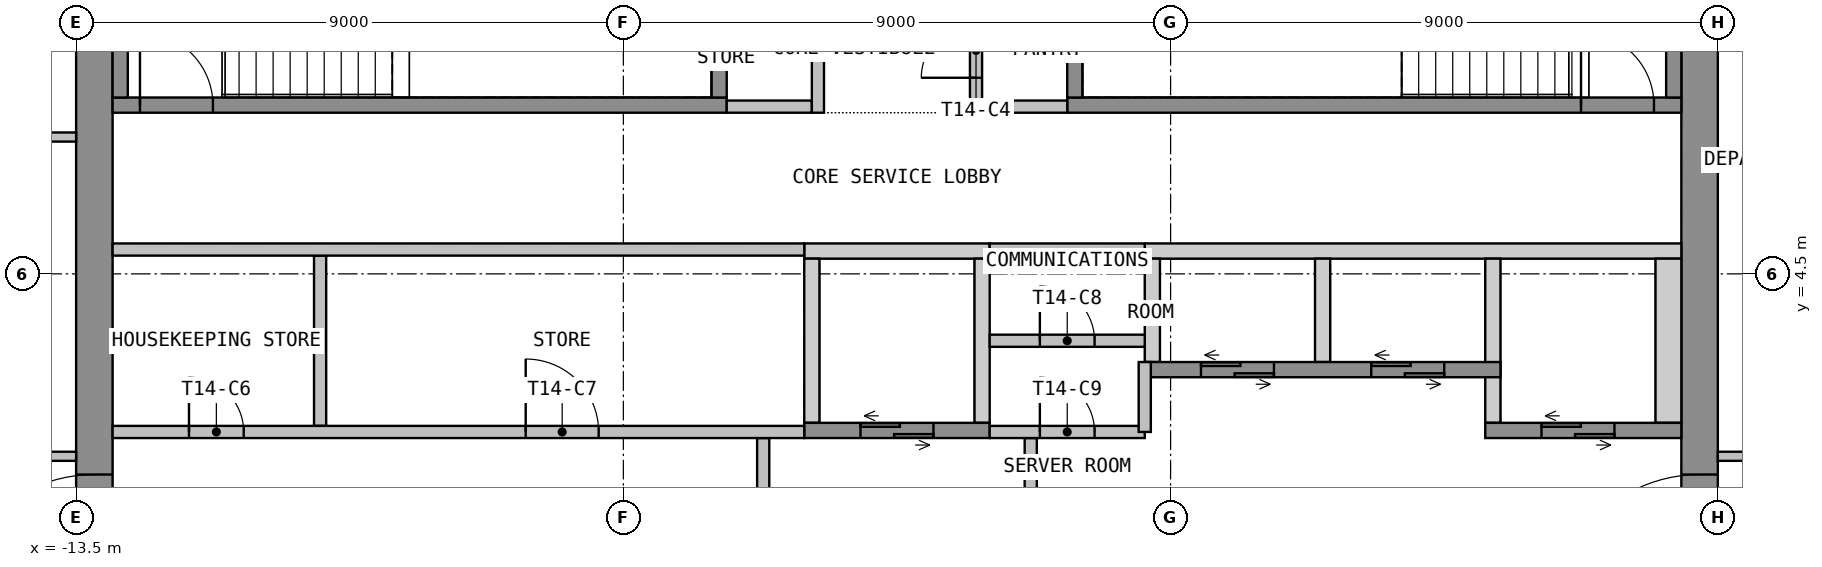
"""IFC4 building model, lengths in metres.
Left out: names, types, materials, properties, quantities, classifications, styles, units other than length and angle.
Written with IfcOpenShell. Run it as: python <this file> out.ifc"""

import sys

from ifc_helpers import new_model, si_unit, direction, frame, frame_2d, origin, place, context, subcontext, project, spatial, polyline, rectangle, outline, extrude, element, fill, save


model = new_model("IFC4")
c1 = context("Model", 3, precision=1e-05, world=origin(), true_north=direction((0.0, 1.0)))
c2 = subcontext(c1, "Body", "Model", "MODEL_VIEW")
j1 = project(units=[si_unit("LENGTHUNIT", "METRE"), si_unit("PLANEANGLEUNIT", "RADIAN")], contexts=[c1])
p1 = place(None, origin())
s1 = spatial("IfcSite", under=j1, at=p1, CompositionType="ELEMENT")
p2 = place(p1, origin())
s2 = spatial("IfcBuilding", under=s1, at=p2, CompositionType="ELEMENT")
p3 = place(p2, frame((0.0, 0.0, 195.6)))
s3 = spatial("IfcBuildingStorey", under=s2, at=p3, CompositionType="ELEMENT", Elevation=195.6)
p4 = place(p3, frame((-13.2, -10.65, 0.0), z_axis=(0.0, 0.0, 1.0), x_axis=(0.0, 1.0, 0.0)))
e1 = element("IfcWall", 1, at=p4, inside=s3, PredefinedType="SHEAR", context=c2, shape_type="SweptSolid", body=[
    extrude(rectangle(XDim=21.3, YDim=0.6, at=frame_2d((10.65, 0.0))), origin(), (0.0, 0.0, 1.0), 3.55),
])
p5 = place(p4, frame((9.45, 0.0, 0.0)))
e2 = element("IfcOpeningElement", 2, at=p5, cuts=e1, PredefinedType="OPENING", context=c2, shape_type="SweptSolid", body=[
    extrude(rectangle(XDim=2.4, YDim=2.1, at=frame_2d((1.2, 1.05))), frame((0.0, 0.31, 0.0), z_axis=(0.0, -1.0, 0.0), x_axis=(1.0, 0.0, 0.0)), (0.0, 0.0, 1.0), 0.62),
])
p6 = place(p3, frame((13.2, -10.65, 0.0), z_axis=(0.0, 0.0, 1.0), x_axis=(0.0, 1.0, 0.0)))
e3 = element("IfcWall", 3, at=p6, inside=s3, PredefinedType="SHEAR", context=c2, shape_type="SweptSolid", body=[
    extrude(rectangle(XDim=21.3, YDim=0.6, at=frame_2d((10.65, 0.0))), origin(), (0.0, 0.0, 1.0), 3.55),
])
p7 = place(p6, frame((9.45, 0.0, 0.0)))
e4 = element("IfcOpeningElement", 4, at=p7, cuts=e3, PredefinedType="OPENING", context=c2, shape_type="SweptSolid", body=[
    extrude(rectangle(XDim=2.4, YDim=2.1, at=frame_2d((1.2, 1.05))), frame((0.0, 0.31, 0.0), z_axis=(0.0, -1.0, 0.0), x_axis=(1.0, 0.0, 0.0)), (0.0, 0.0, 1.0), 0.62),
])
p8 = place(p3, origin())
e5 = element("IfcWall", 5, at=p8, inside=s3, PredefinedType="SHEAR", context=c2, shape_type="SweptSolid", body=[
    extrude(outline(polyline([(-1.525, 4.75), (1.525, 4.75), (1.525, 5.0), (-1.525, 5.0), (-1.525, 4.75)])), origin(), (0.0, 0.0, 1.0), 3.55),
])
p9 = place(p3, origin())
e6 = element("IfcWall", 6, at=p9, inside=s3, PredefinedType="SHEAR", context=c2, shape_type="SweptSolid", body=[
    extrude(outline(polyline([(4.075, 4.75), (12.9, 4.75), (12.9, 5.0), (4.075, 5.0), (4.075, 4.75)])), origin(), (0.0, 0.0, 1.0), 3.55),
])
p10 = place(p3, origin())
e7 = element("IfcWall", 7, at=p10, inside=s3, PredefinedType="SHEAR", context=c2, shape_type="SweptSolid", body=[
    extrude(outline(polyline([(-1.525, 2.05), (-1.275, 2.05), (-1.275, 4.75), (-1.525, 4.75), (-1.525, 2.05)])), origin(), (0.0, 0.0, 1.0), 3.55),
])
p11 = place(p3, origin())
e8 = element("IfcWall", 8, at=p11, inside=s3, PredefinedType="SHEAR", context=c2, shape_type="SweptSolid", body=[
    extrude(outline(polyline([(1.275, 2.05), (1.525, 2.05), (1.525, 4.75), (1.275, 4.75), (1.275, 2.05)])), origin(), (0.0, 0.0, 1.0), 3.55),
])
p12 = place(p3, origin())
e9 = element("IfcWall", 9, at=p12, inside=s3, PredefinedType="SHEAR", context=c2, shape_type="SweptSolid", body=[
    extrude(outline(polyline([(9.675, 2.05), (9.925, 2.05), (9.925, 4.75), (9.675, 4.75), (9.675, 2.05)])), origin(), (0.0, 0.0, 1.0), 3.55),
])
p13 = place(p3, origin())
e10 = element("IfcWall", 10, at=p13, inside=s3, PredefinedType="SHEAR", context=c2, shape_type="SweptSolid", body=[
    extrude(outline(polyline([(12.475, 2.05), (12.9, 2.05), (12.9, 4.75), (12.475, 4.75), (12.475, 2.05)])), origin(), (0.0, 0.0, 1.0), 3.55),
])
p14 = place(p3, origin())
e11 = element("IfcWall", 11, at=p14, inside=s3, PredefinedType="SHEAR", context=c2, shape_type="SweptSolid", body=[
    extrude(outline(polyline([(4.075, 3.05), (4.325, 3.05), (4.325, 4.75), (4.075, 4.75), (4.075, 3.05)])), origin(), (0.0, 0.0, 1.0), 3.55),
])
p15 = place(p3, origin())
e12 = element("IfcWall", 12, at=p15, inside=s3, PredefinedType="SHEAR", context=c2, shape_type="SweptSolid", body=[
    extrude(outline(polyline([(6.875, 3.05), (7.125, 3.05), (7.125, 4.75), (6.875, 4.75), (6.875, 3.05)])), origin(), (0.0, 0.0, 1.0), 3.55),
])
p16 = place(p3, frame((-1.525, 1.925, 0.0), z_axis=(0.0, 0.0, 1.0), x_axis=(1.0, 0.0, 0.0)))
e13 = element("IfcWall", 13, at=p16, inside=s3, PredefinedType="SHEAR", context=c2, shape_type="SweptSolid", body=[
    extrude(rectangle(XDim=3.05, YDim=0.25, at=frame_2d((1.525, 0.0))), origin(), (0.0, 0.0, 1.0), 3.55),
])
p17 = place(p16, frame((0.925, 0.0, 0.0)))
e14 = element("IfcOpeningElement", 14, at=p17, cuts=e13, PredefinedType="OPENING", context=c2, shape_type="SweptSolid", body=[
    extrude(rectangle(XDim=1.2, YDim=2.1, at=frame_2d((0.6, 1.05))), frame((0.0, 0.135, 0.0), z_axis=(0.0, -1.0, 0.0), x_axis=(1.0, 0.0, 0.0)), (0.0, 0.0, 1.0), 0.27),
])
p18 = place(p3, frame((4.075, 2.925, 0.0), z_axis=(0.0, 0.0, 1.0), x_axis=(1.0, 0.0, 0.0)))
e15 = element("IfcWall", 15, at=p18, inside=s3, PredefinedType="SHEAR", context=c2, shape_type="SweptSolid", body=[
    extrude(rectangle(XDim=5.85, YDim=0.25, at=frame_2d((2.925, 0.0))), origin(), (0.0, 0.0, 1.0), 3.55),
])
p19 = place(p18, frame((0.925, 0.0, 0.0)))
e16 = element("IfcOpeningElement", 16, at=p19, cuts=e15, PredefinedType="OPENING", context=c2, shape_type="SweptSolid", body=[
    extrude(rectangle(XDim=1.2, YDim=2.1, at=frame_2d((0.6, 1.05))), frame((0.0, 0.135, 0.0), z_axis=(0.0, -1.0, 0.0), x_axis=(1.0, 0.0, 0.0)), (0.0, 0.0, 1.0), 0.27),
])
p20 = place(p18, frame((3.725, 0.0, 0.0)))
e17 = element("IfcOpeningElement", 17, at=p20, cuts=e15, PredefinedType="OPENING", context=c2, shape_type="SweptSolid", body=[
    extrude(rectangle(XDim=1.2, YDim=2.1, at=frame_2d((0.6, 1.05))), frame((0.0, 0.135, 0.0), z_axis=(0.0, -1.0, 0.0), x_axis=(1.0, 0.0, 0.0)), (0.0, 0.0, 1.0), 0.27),
])
p21 = place(p3, frame((9.675, 1.925, 0.0), z_axis=(0.0, 0.0, 1.0), x_axis=(1.0, 0.0, 0.0)))
e18 = element("IfcWall", 18, at=p21, inside=s3, PredefinedType="SHEAR", context=c2, shape_type="SweptSolid", body=[
    extrude(rectangle(XDim=3.225, YDim=0.25, at=frame_2d((1.612, 0.0))), origin(), (0.0, 0.0, 1.0), 3.55),
])
p22 = place(p21, frame((0.925, 0.0, 0.0)))
e19 = element("IfcOpeningElement", 19, at=p22, cuts=e18, PredefinedType="OPENING", context=c2, shape_type="SweptSolid", body=[
    extrude(rectangle(XDim=1.2, YDim=2.1, at=frame_2d((0.6, 1.05))), frame((0.0, 0.135, 0.0), z_axis=(0.0, -1.0, 0.0), x_axis=(1.0, 0.0, 0.0)), (0.0, 0.0, 1.0), 0.27),
])
p23 = place(p3, frame((-2.2, -1.8, 0.0), z_axis=(0.0, 0.0, 1.0), x_axis=(0.0, 1.0, 0.0)))
e20 = element("IfcWall", 20, at=p23, inside=s3, PredefinedType="PARTITIONING", context=c2, shape_type="SweptSolid", body=[
    extrude(rectangle(XDim=3.6, YDim=0.2, at=frame_2d((1.8, 0.0))), origin(), (0.0, 0.0, 1.0), 3.55),
])
p24 = place(p23, frame((1.2, 0.0, 0.0)))
e21 = element("IfcOpeningElement", 21, at=p24, cuts=e20, PredefinedType="OPENING", context=c2, shape_type="SweptSolid", body=[
    extrude(rectangle(XDim=1.2, YDim=2.1, at=frame_2d((0.6, 1.05))), frame((0.0, 0.11, 0.0), z_axis=(0.0, -1.0, 0.0), x_axis=(1.0, 0.0, 0.0)), (0.0, 0.0, 1.0), 0.22),
])
p25 = place(p3, frame((2.2, -1.8, 0.0), z_axis=(0.0, 0.0, 1.0), x_axis=(0.0, 1.0, 0.0)))
e22 = element("IfcWall", 22, at=p25, inside=s3, PredefinedType="PARTITIONING", context=c2, shape_type="SweptSolid", body=[
    extrude(rectangle(XDim=3.6, YDim=0.2, at=frame_2d((1.8, 0.0))), origin(), (0.0, 0.0, 1.0), 3.55),
])
p26 = place(p25, frame((1.2, 0.0, 0.0)))
e23 = element("IfcOpeningElement", 23, at=p26, cuts=e22, PredefinedType="OPENING", context=c2, shape_type="SweptSolid", body=[
    extrude(rectangle(XDim=1.2, YDim=2.1, at=frame_2d((0.6, 1.05))), frame((0.0, 0.11, 0.0), z_axis=(0.0, -1.0, 0.0), x_axis=(1.0, 0.0, 0.0)), (0.0, 0.0, 1.0), 0.22),
])
p27 = place(p3, frame((-12.9, 7.275, 0.0), z_axis=(0.0, 0.0, 1.0), x_axis=(1.0, 0.0, 0.0)))
e24 = element("IfcWall", 24, at=p27, inside=s3, PredefinedType="SHEAR", context=c2, shape_type="SweptSolid", body=[
    extrude(rectangle(XDim=10.1, YDim=0.25, at=frame_2d((5.05, 0.0))), origin(), (0.0, 0.0, 1.0), 3.55),
])
p28 = place(p27, frame((0.45, 0.0, 0.0)))
e25 = element("IfcOpeningElement", 25, at=p28, cuts=e24, PredefinedType="OPENING", context=c2, shape_type="SweptSolid", body=[
    extrude(rectangle(XDim=1.2, YDim=2.1, at=frame_2d((0.6, 1.05))), frame((0.0, 0.135, 0.0), z_axis=(0.0, -1.0, 0.0), x_axis=(1.0, 0.0, 0.0)), (0.0, 0.0, 1.0), 0.27),
])
for number, where, z_axis, x_axis in (
    (26, (-12.775, 7.4, 0.0), (0.0, 0.0, 1.0), (0.0, 1.0, 0.0)),
    (27, (-2.925, 7.4, 0.0), (0.0, 0.0, 1.0), (0.0, 1.0, 0.0)),
):
    element("IfcWall", number, at=place(p3, frame(where, z_axis=z_axis, x_axis=x_axis)), inside=s3, PredefinedType="SHEAR", context=c2, shape_type="SweptSolid", body=[
        extrude(rectangle(XDim=3.25, YDim=0.25, at=frame_2d((1.625, 0.0))), origin(), (0.0, 0.0, 1.0), 3.55),
    ])
p29 = place(p3, frame((2.8, 7.275, 0.0), z_axis=(0.0, 0.0, 1.0), x_axis=(1.0, 0.0, 0.0)))
e28 = element("IfcWall", 28, at=p29, inside=s3, PredefinedType="SHEAR", context=c2, shape_type="SweptSolid", body=[
    extrude(rectangle(XDim=10.1, YDim=0.25, at=frame_2d((5.05, 0.0))), origin(), (0.0, 0.0, 1.0), 3.55),
])
p30 = place(p29, frame((8.45, 0.0, 0.0)))
e29 = element("IfcOpeningElement", 29, at=p30, cuts=e28, PredefinedType="OPENING", context=c2, shape_type="SweptSolid", body=[
    extrude(rectangle(XDim=1.2, YDim=2.1, at=frame_2d((0.6, 1.05))), frame((0.0, 0.135, 0.0), z_axis=(0.0, -1.0, 0.0), x_axis=(1.0, 0.0, 0.0)), (0.0, 0.0, 1.0), 0.27),
])
for number, where, z_axis, x_axis in (
    (30, (2.925, 7.4, 0.0), (0.0, 0.0, 1.0), (0.0, 1.0, 0.0)),
    (31, (12.775, 7.4, 0.0), (0.0, 0.0, 1.0), (0.0, 1.0, 0.0)),
):
    element("IfcWall", number, at=place(p3, frame(where, z_axis=z_axis, x_axis=x_axis)), inside=s3, PredefinedType="SHEAR", context=c2, shape_type="SweptSolid", body=[
        extrude(rectangle(XDim=3.25, YDim=0.25, at=frame_2d((1.625, 0.0))), origin(), (0.0, 0.0, 1.0), 3.55),
    ])
for number, where, z_axis, x_axis in (
    (32, (-2.8, 7.25, 0.0), (0.0, 0.0, 1.0), (1.0, 0.0, 0.0)),
    (33, (1.4, 7.25, 0.0), (0.0, 0.0, 1.0), (1.0, 0.0, 0.0)),
):
    element("IfcWall", number, at=place(p3, frame(where, z_axis=z_axis, x_axis=x_axis)), inside=s3, PredefinedType="PARTITIONING", context=c2, shape_type="SweptSolid", body=[
        extrude(rectangle(XDim=1.4, YDim=0.2, at=frame_2d((0.7, 0.0))), origin(), (0.0, 0.0, 1.0), 3.55),
    ])
p31 = place(p3, frame((-1.3, 7.15, 0.0), z_axis=(0.0, 0.0, 1.0), x_axis=(0.0, 1.0, 0.0)))
e34 = element("IfcWall", 34, at=p31, inside=s3, PredefinedType="PARTITIONING", context=c2, shape_type="SweptSolid", body=[
    extrude(rectangle(XDim=3.5, YDim=0.2, at=frame_2d((1.75, 0.0))), origin(), (0.0, 0.0, 1.0), 3.55),
])
p32 = place(p31, frame((1.4, 0.0, 0.0)))
e35 = element("IfcOpeningElement", 35, at=p32, cuts=e34, PredefinedType="OPENING", context=c2, shape_type="SweptSolid", body=[
    extrude(rectangle(XDim=0.9, YDim=2.1, at=frame_2d((0.45, 1.05))), frame((0.0, 0.11, 0.0), z_axis=(0.0, -1.0, 0.0), x_axis=(1.0, 0.0, 0.0)), (0.0, 0.0, 1.0), 0.22),
])
p33 = place(p3, frame((1.3, 7.15, 0.0), z_axis=(0.0, 0.0, 1.0), x_axis=(0.0, 1.0, 0.0)))
e36 = element("IfcWall", 36, at=p33, inside=s3, PredefinedType="PARTITIONING", context=c2, shape_type="SweptSolid", body=[
    extrude(rectangle(XDim=3.5, YDim=0.2, at=frame_2d((1.75, 0.0))), origin(), (0.0, 0.0, 1.0), 3.55),
])
p34 = place(p33, frame((0.575, 0.0, 0.0)))
e37 = element("IfcOpeningElement", 37, at=p34, cuts=e36, PredefinedType="OPENING", context=c2, shape_type="SweptSolid", body=[
    extrude(rectangle(XDim=0.9, YDim=2.1, at=frame_2d((0.45, 1.05))), frame((0.0, 0.11, 0.0), z_axis=(0.0, -1.0, 0.0), x_axis=(1.0, 0.0, 0.0)), (0.0, 0.0, 1.0), 0.22),
])
p35 = place(p33, frame((2.225, 0.0, 0.0)))
e38 = element("IfcOpeningElement", 38, at=p35, cuts=e36, PredefinedType="OPENING", context=c2, shape_type="SweptSolid", body=[
    extrude(rectangle(XDim=0.9, YDim=2.1, at=frame_2d((0.45, 1.05))), frame((0.0, 0.11, 0.0), z_axis=(0.0, -1.0, 0.0), x_axis=(1.0, 0.0, 0.0)), (0.0, 0.0, 1.0), 0.22),
])
p36 = place(p3, frame((-9.488, 2.0, 0.0), z_axis=(0.0, 0.0, 1.0), x_axis=(0.0, 1.0, 0.0)))
e39 = element("IfcWall", 39, at=p36, inside=s3, PredefinedType="PARTITIONING", context=c2, shape_type="SweptSolid", body=[
    extrude(rectangle(XDim=2.8, YDim=0.2, at=frame_2d((1.4, 0.0))), origin(), (0.0, 0.0, 1.0), 3.55),
])
p37 = place(p3, frame((-12.9, 1.9, 0.0), z_axis=(0.0, 0.0, 1.0), x_axis=(1.0, 0.0, 0.0)))
e40 = element("IfcWall", 40, at=p37, inside=s3, PredefinedType="PARTITIONING", context=c2, shape_type="SweptSolid", body=[
    extrude(rectangle(XDim=11.375, YDim=0.2, at=frame_2d((5.688, 0.0))), origin(), (0.0, 0.0, 1.0), 3.55),
])
p38 = place(p37, frame((1.256, 0.0, 0.0)))
e41 = element("IfcOpeningElement", 41, at=p38, cuts=e40, PredefinedType="OPENING", context=c2, shape_type="SweptSolid", body=[
    extrude(rectangle(XDim=0.9, YDim=2.1, at=frame_2d((0.45, 1.05))), frame((0.0, 0.11, 0.0), z_axis=(0.0, -1.0, 0.0), x_axis=(1.0, 0.0, 0.0)), (0.0, 0.0, 1.0), 0.22),
])
p39 = place(p37, frame((6.794, 0.0, 0.0)))
e42 = element("IfcOpeningElement", 42, at=p39, cuts=e40, PredefinedType="OPENING", context=c2, shape_type="SweptSolid", body=[
    extrude(rectangle(XDim=1.2, YDim=2.1, at=frame_2d((0.6, 1.05))), frame((0.0, 0.11, 0.0), z_axis=(0.0, -1.0, 0.0), x_axis=(1.0, 0.0, 0.0)), (0.0, 0.0, 1.0), 0.22),
])
p40 = place(p3, frame((-12.9, 4.9, 0.0), z_axis=(0.0, 0.0, 1.0), x_axis=(1.0, 0.0, 0.0)))
e43 = element("IfcWall", 43, at=p40, inside=s3, PredefinedType="PARTITIONING", context=c2, shape_type="SweptSolid", body=[
    extrude(rectangle(XDim=11.375, YDim=0.2, at=frame_2d((5.688, 0.0))), origin(), (0.0, 0.0, 1.0), 3.55),
])
p41 = place(p3, frame((1.525, 3.4, 0.0), z_axis=(0.0, 0.0, 1.0), x_axis=(1.0, 0.0, 0.0)))
e44 = element("IfcWall", 44, at=p41, inside=s3, PredefinedType="PARTITIONING", context=c2, shape_type="SweptSolid", body=[
    extrude(rectangle(XDim=2.55, YDim=0.2, at=frame_2d((1.275, 0.0))), origin(), (0.0, 0.0, 1.0), 3.55),
])
p42 = place(p41, frame((0.825, 0.0, 0.0)))
e45 = element("IfcOpeningElement", 45, at=p42, cuts=e44, PredefinedType="OPENING", context=c2, shape_type="SweptSolid", body=[
    extrude(rectangle(XDim=0.9, YDim=2.1, at=frame_2d((0.45, 1.05))), frame((0.0, 0.11, 0.0), z_axis=(0.0, -1.0, 0.0), x_axis=(1.0, 0.0, 0.0)), (0.0, 0.0, 1.0), 0.22),
])
p43 = place(p3, frame((1.525, 1.9, 0.0), z_axis=(0.0, 0.0, 1.0), x_axis=(1.0, 0.0, 0.0)))
e46 = element("IfcWall", 46, at=p43, inside=s3, PredefinedType="PARTITIONING", context=c2, shape_type="SweptSolid", body=[
    extrude(rectangle(XDim=2.55, YDim=0.2, at=frame_2d((1.275, 0.0))), origin(), (0.0, 0.0, 1.0), 3.55),
])
p44 = place(p43, frame((0.825, 0.0, 0.0)))
e47 = element("IfcOpeningElement", 47, at=p44, cuts=e46, PredefinedType="OPENING", context=c2, shape_type="SweptSolid", body=[
    extrude(rectangle(XDim=0.9, YDim=2.1, at=frame_2d((0.45, 1.05))), frame((0.0, 0.11, 0.0), z_axis=(0.0, -1.0, 0.0), x_axis=(1.0, 0.0, 0.0)), (0.0, 0.0, 1.0), 0.22),
])
p45 = place(p3, frame((1.525, 4.9, 0.0), z_axis=(0.0, 0.0, 1.0), x_axis=(1.0, 0.0, 0.0)))
e48 = element("IfcWall", 48, at=p45, inside=s3, PredefinedType="PARTITIONING", context=c2, shape_type="SweptSolid", body=[
    extrude(rectangle(XDim=2.55, YDim=0.2, at=frame_2d((1.275, 0.0))), origin(), (0.0, 0.0, 1.0), 3.55),
])
p46 = place(p3, frame((4.075, 1.9, 0.0), z_axis=(0.0, 0.0, 1.0), x_axis=(0.0, 1.0, 0.0)))
e49 = element("IfcWall", 49, at=p46, inside=s3, PredefinedType="PARTITIONING", context=c2, shape_type="SweptSolid", body=[
    extrude(rectangle(XDim=1.15, YDim=0.2, at=frame_2d((0.575, 0.0))), origin(), (0.0, 0.0, 1.0), 3.55),
])
for number, where, z_axis, x_axis in (
    (50, (-13.5, 1.5, 0.0), (0.0, 0.0, 1.0), (-1.0, 0.0, 0.0)),
    (51, (-17.925, 6.75, 0.0), (0.0, 0.0, 1.0), (1.0, 0.0, 0.0)),
):
    element("IfcWall", number, at=place(p3, frame(where, z_axis=z_axis, x_axis=x_axis)), inside=s3, PredefinedType="PARTITIONING", context=c2, shape_type="SweptSolid", body=[
        extrude(rectangle(XDim=4.425, YDim=0.15, at=frame_2d((2.212, 0.0))), origin(), (0.0, 0.0, 1.0), 3.55),
    ])
p47 = place(p3, frame((18.075, 1.5, 0.0), z_axis=(0.0, 0.0, 1.0), x_axis=(-1.0, 0.0, 0.0)))
e52 = element("IfcWall", 52, at=p47, inside=s3, PredefinedType="PARTITIONING", context=c2, shape_type="SweptSolid", body=[
    extrude(rectangle(XDim=4.575, YDim=0.15, at=frame_2d((2.288, 0.0))), origin(), (0.0, 0.0, 1.0), 3.55),
])
p48 = place(p5, origin())
e53 = element("IfcDoor", 53, at=p48, inside=s3, OperationType="DOUBLE_DOOR_DOUBLE_SWING", PredefinedType="DOOR", context=c2, shape_type="SweptSolid", body=[
    extrude(rectangle(XDim=2.4, YDim=2.1, at=frame_2d((1.2, 1.05))), frame((0.0, 0.025, 0.0), z_axis=(0.0, -1.0, 0.0), x_axis=(1.0, 0.0, 0.0)), (0.0, 0.0, 1.0), 0.05),
])
fill(e2, e53)
p49 = place(p7, origin())
e54 = element("IfcDoor", 54, at=p49, inside=s3, OperationType="DOUBLE_DOOR_DOUBLE_SWING", PredefinedType="DOOR", context=c2, shape_type="SweptSolid", body=[
    extrude(rectangle(XDim=2.4, YDim=2.1, at=frame_2d((1.2, 1.05))), frame((0.0, 0.025, 0.0), z_axis=(0.0, -1.0, 0.0), x_axis=(1.0, 0.0, 0.0)), (0.0, 0.0, 1.0), 0.05),
])
fill(e4, e54)
p50 = place(p17, origin())
e55 = element("IfcDoor", 55, at=p50, inside=s3, OperationType="DOUBLE_DOOR_SLIDING", PredefinedType="DOOR", context=c2, shape_type="SweptSolid", body=[
    extrude(rectangle(XDim=1.2, YDim=2.1, at=frame_2d((0.6, 1.05))), frame((0.0, 0.025, 0.0), z_axis=(0.0, -1.0, 0.0), x_axis=(1.0, 0.0, 0.0)), (0.0, 0.0, 1.0), 0.05),
])
fill(e14, e55)
p51 = place(p19, origin())
e56 = element("IfcDoor", 56, at=p51, inside=s3, OperationType="DOUBLE_DOOR_SLIDING", PredefinedType="DOOR", context=c2, shape_type="SweptSolid", body=[
    extrude(rectangle(XDim=1.2, YDim=2.1, at=frame_2d((0.6, 1.05))), frame((0.0, 0.025, 0.0), z_axis=(0.0, -1.0, 0.0), x_axis=(1.0, 0.0, 0.0)), (0.0, 0.0, 1.0), 0.05),
])
fill(e16, e56)
p52 = place(p20, origin())
e57 = element("IfcDoor", 57, at=p52, inside=s3, OperationType="DOUBLE_DOOR_SLIDING", PredefinedType="DOOR", context=c2, shape_type="SweptSolid", body=[
    extrude(rectangle(XDim=1.2, YDim=2.1, at=frame_2d((0.6, 1.05))), frame((0.0, 0.025, 0.0), z_axis=(0.0, -1.0, 0.0), x_axis=(1.0, 0.0, 0.0)), (0.0, 0.0, 1.0), 0.05),
])
fill(e17, e57)
p53 = place(p22, origin())
e58 = element("IfcDoor", 58, at=p53, inside=s3, OperationType="DOUBLE_DOOR_SLIDING", PredefinedType="DOOR", context=c2, shape_type="SweptSolid", body=[
    extrude(rectangle(XDim=1.2, YDim=2.1, at=frame_2d((0.6, 1.05))), frame((0.0, 0.025, 0.0), z_axis=(0.0, -1.0, 0.0), x_axis=(1.0, 0.0, 0.0)), (0.0, 0.0, 1.0), 0.05),
])
fill(e19, e58)
p54 = place(p28, origin())
e59 = element("IfcDoor", 59, at=p54, inside=s3, OperationType="SINGLE_SWING_LEFT", PredefinedType="DOOR", context=c2, shape_type="SweptSolid", body=[
    extrude(rectangle(XDim=1.2, YDim=2.1, at=frame_2d((0.6, 1.05))), frame((0.0, 0.025, 0.0), z_axis=(0.0, -1.0, 0.0), x_axis=(1.0, 0.0, 0.0)), (0.0, 0.0, 1.0), 0.05),
])
fill(e25, e59)
p55 = place(p30, origin())
e60 = element("IfcDoor", 60, at=p55, inside=s3, OperationType="SINGLE_SWING_LEFT", PredefinedType="DOOR", context=c2, shape_type="SweptSolid", body=[
    extrude(rectangle(XDim=1.2, YDim=2.1, at=frame_2d((0.6, 1.05))), frame((0.0, 0.025, 0.0), z_axis=(0.0, -1.0, 0.0), x_axis=(1.0, 0.0, 0.0)), (0.0, 0.0, 1.0), 0.05),
])
fill(e29, e60)
p56 = place(p34, origin())
e61 = element("IfcDoor", 61, at=p56, inside=s3, OperationType="SINGLE_SWING_LEFT", PredefinedType="DOOR", context=c2, shape_type="SweptSolid", body=[
    extrude(rectangle(XDim=0.9, YDim=2.1, at=frame_2d((0.45, 1.05))), frame((0.0, 0.025, 0.0), z_axis=(0.0, -1.0, 0.0), x_axis=(1.0, 0.0, 0.0)), (0.0, 0.0, 1.0), 0.05),
])
fill(e37, e61)
p57 = place(p38, origin())
e62 = element("IfcDoor", 62, at=p57, inside=s3, OperationType="SINGLE_SWING_LEFT", PredefinedType="DOOR", context=c2, shape_type="SweptSolid", body=[
    extrude(rectangle(XDim=0.9, YDim=2.1, at=frame_2d((0.45, 1.05))), frame((0.0, 0.025, 0.0), z_axis=(0.0, -1.0, 0.0), x_axis=(1.0, 0.0, 0.0)), (0.0, 0.0, 1.0), 0.05),
])
fill(e41, e62)
p58 = place(p39, origin())
e63 = element("IfcDoor", 63, at=p58, inside=s3, OperationType="SINGLE_SWING_RIGHT", PredefinedType="DOOR", context=c2, shape_type="SweptSolid", body=[
    extrude(rectangle(XDim=1.2, YDim=2.1, at=frame_2d((0.6, 1.05))), frame((0.0, 0.025, 0.0), z_axis=(0.0, -1.0, 0.0), x_axis=(1.0, 0.0, 0.0)), (0.0, 0.0, 1.0), 0.05),
])
fill(e42, e63)
p59 = place(p42, origin())
e64 = element("IfcDoor", 64, at=p59, inside=s3, OperationType="SINGLE_SWING_LEFT", PredefinedType="DOOR", context=c2, shape_type="SweptSolid", body=[
    extrude(rectangle(XDim=0.9, YDim=2.1, at=frame_2d((0.45, 1.05))), frame((0.0, 0.025, 0.0), z_axis=(0.0, -1.0, 0.0), x_axis=(1.0, 0.0, 0.0)), (0.0, 0.0, 1.0), 0.05),
])
fill(e45, e64)
p60 = place(p44, origin())
e65 = element("IfcDoor", 65, at=p60, inside=s3, OperationType="SINGLE_SWING_LEFT", PredefinedType="DOOR", context=c2, shape_type="SweptSolid", body=[
    extrude(rectangle(XDim=0.9, YDim=2.1, at=frame_2d((0.45, 1.05))), frame((0.0, 0.025, 0.0), z_axis=(0.0, -1.0, 0.0), x_axis=(1.0, 0.0, 0.0)), (0.0, 0.0, 1.0), 0.05),
])
fill(e47, e65)
save(model, sys.argv[1])
